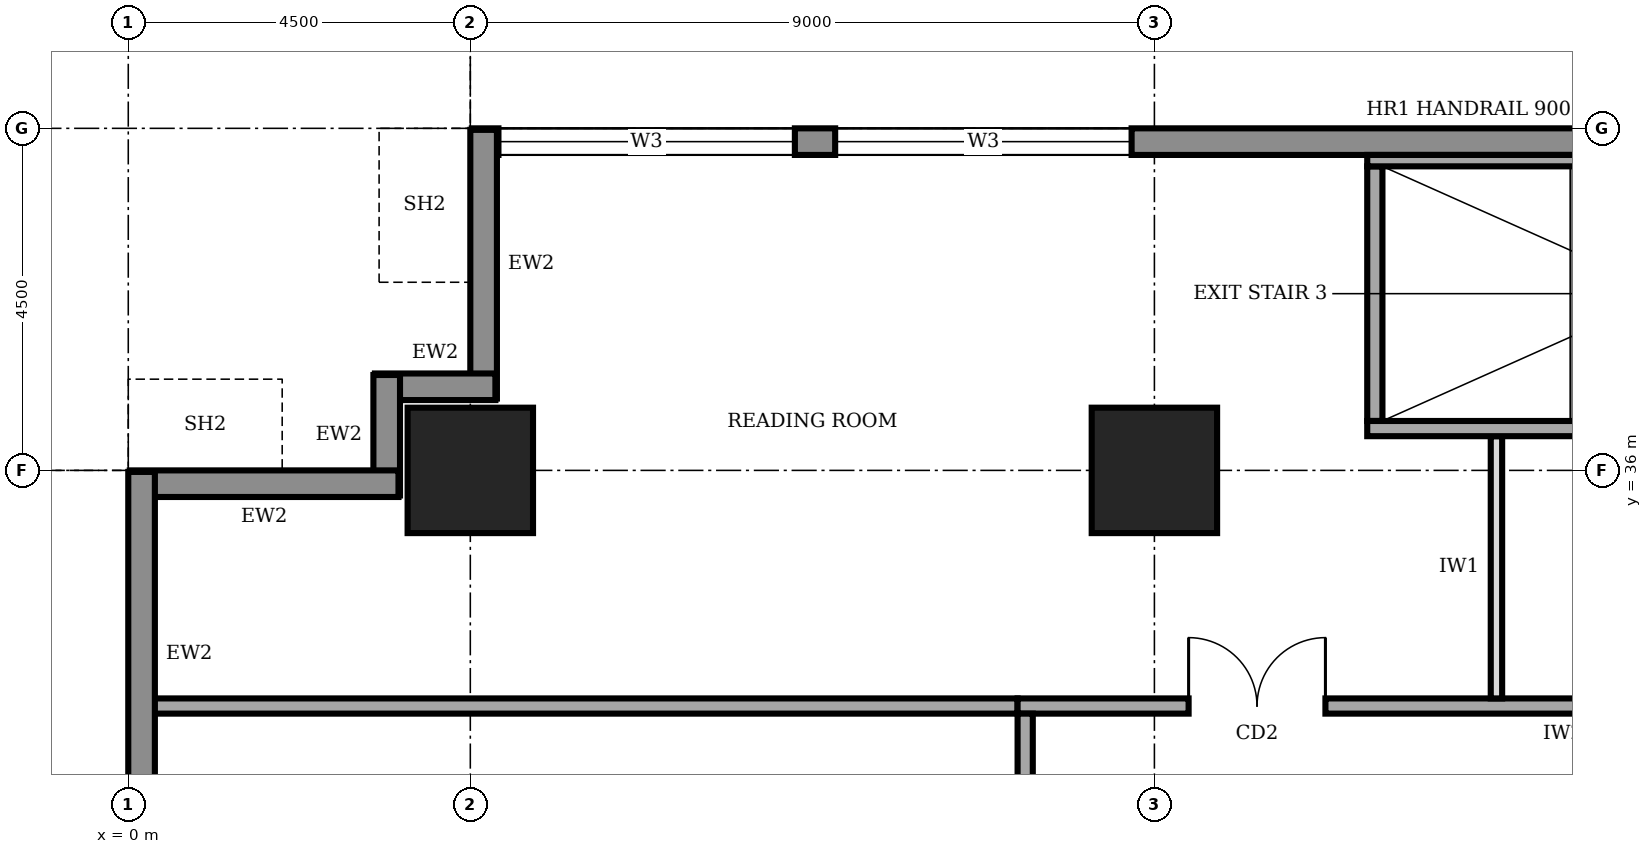
"""IFC4 building model, lengths in metres.
Left out: names, types, materials, properties, quantities, classifications, styles, units other than length and angle.
Written with IfcOpenShell. Run it as: python <this file> out.ifc"""

import sys

from ifc_helpers import new_model, si_unit, direction, frame, frame_2d, origin, origin_2d, place, context, subcontext, project, spatial, rectangle, extrude, element, fill, save


model = new_model("IFC4")
c1 = context("Model", 3, precision=1e-05, world=origin(), true_north=direction((0.0, 1.0)))
c2 = subcontext(c1, "Body", "Model", "MODEL_VIEW")
j1 = project(units=[si_unit("LENGTHUNIT", "METRE"), si_unit("PLANEANGLEUNIT", "RADIAN")], contexts=[c1])
p1 = place(None, origin())
s1 = spatial("IfcSite", under=j1, at=p1, CompositionType="ELEMENT")
p2 = place(p1, origin())
s2 = spatial("IfcBuilding", under=s1, at=p2, CompositionType="ELEMENT")
p3 = place(p2, frame((0.0, 0.0, 201.0)))
s3 = spatial("IfcBuildingStorey", under=s2, at=p3, CompositionType="ELEMENT", Elevation=201.0)
for number, where, z_axis, x_axis in (
    (1, (4.5, 36.0, 0.0), (0.0, 0.0, 1.0), (1.0, 0.0, 0.0)),
    (2, (13.5, 36.0, 0.0), (0.0, 0.0, 1.0), (1.0, 0.0, 0.0)),
):
    element("IfcColumn", number, at=place(p3, frame(where, z_axis=z_axis, x_axis=x_axis)), inside=s3, PredefinedType="COLUMN", context=c2, shape_type="SweptSolid", body=[
        extrude(rectangle(XDim=1.65, YDim=1.65, at=origin_2d()), origin(), (0.0, 0.0, 1.0), 4.0),
    ])
p4 = place(p3, frame((35.98, 40.325, 0.0), z_axis=(0.0, 0.0, 1.0), x_axis=(-1.0, 0.0, 0.0)))
e3 = element("IfcWall", 3, at=p4, inside=s3, PredefinedType="STANDARD", context=c2, shape_type="SweptSolid", body=[
    extrude(rectangle(XDim=31.46, YDim=0.35, at=frame_2d((15.73, 0.0))), origin(), (0.0, 0.0, 1.0), 3.75),
])
p5 = place(p4, frame((27.21, 0.0, 0.95)))
e4 = element("IfcOpeningElement", 4, at=p5, cuts=e3, PredefinedType="OPENING", context=c2, shape_type="SweptSolid", body=[
    extrude(rectangle(XDim=3.9, YDim=1.8, at=frame_2d((1.95, 0.9))), frame((0.0, 0.185, 0.0), z_axis=(0.0, -1.0, 0.0), x_axis=(1.0, 0.0, 0.0)), (0.0, 0.0, 1.0), 0.37),
])
p6 = place(p4, frame((22.78, 0.0, 0.95)))
e5 = element("IfcOpeningElement", 5, at=p6, cuts=e3, PredefinedType="OPENING", context=c2, shape_type="SweptSolid", body=[
    extrude(rectangle(XDim=3.9, YDim=1.8, at=frame_2d((1.95, 0.9))), frame((0.0, 0.185, 0.0), z_axis=(0.0, -1.0, 0.0), x_axis=(1.0, 0.0, 0.0)), (0.0, 0.0, 1.0), 0.37),
])
p7 = place(p4, frame((4.78, 0.0, 0.95)))
e6 = element("IfcOpeningElement", 6, at=p7, cuts=e3, PredefinedType="OPENING", context=c2, shape_type="SweptSolid", body=[
    extrude(rectangle(XDim=3.9, YDim=1.8, at=frame_2d((1.95, 0.9))), frame((0.0, 0.185, 0.0), z_axis=(0.0, -1.0, 0.0), x_axis=(1.0, 0.0, 0.0)), (0.0, 0.0, 1.0), 0.37),
])
p8 = place(p3, frame((4.675, 40.48, 0.0), z_axis=(0.0, 0.0, 1.0), x_axis=(0.0, -1.0, 0.0)))
e7 = element("IfcWall", 7, at=p8, inside=s3, PredefinedType="STANDARD", context=c2, shape_type="SweptSolid", body=[
    extrude(rectangle(XDim=3.535, YDim=0.35, at=frame_2d((1.768, 0.0))), origin(), (0.0, 0.0, 1.0), 2.85),
])
for number, where, z_axis, x_axis in (
    (8, (4.83, 37.1, 0.0), (0.0, 0.0, 1.0), (-1.0, 0.0, 0.0)),
    (9, (3.4, 37.255, 0.0), (0.0, 0.0, 1.0), (0.0, -1.0, 0.0)),
):
    element("IfcWall", number, at=place(p3, frame(where, z_axis=z_axis, x_axis=x_axis)), inside=s3, PredefinedType="STANDARD", context=c2, shape_type="SweptSolid", body=[
        extrude(rectangle(XDim=1.585, YDim=0.35, at=frame_2d((0.792, 0.0))), origin(), (0.0, 0.0, 1.0), 3.75),
    ])
p9 = place(p3, frame((3.555, 35.825, 0.0), z_axis=(0.0, 0.0, 1.0), x_axis=(-1.0, 0.0, 0.0)))
e10 = element("IfcWall", 10, at=p9, inside=s3, PredefinedType="STANDARD", context=c2, shape_type="SweptSolid", body=[
    extrude(rectangle(XDim=3.535, YDim=0.35, at=frame_2d((1.768, 0.0))), origin(), (0.0, 0.0, 1.0), 2.85),
])
p10 = place(p3, frame((0.175, 35.98, 0.0), z_axis=(0.0, 0.0, 1.0), x_axis=(0.0, -1.0, 0.0)))
e11 = element("IfcWall", 11, at=p10, inside=s3, PredefinedType="STANDARD", context=c2, shape_type="SweptSolid", body=[
    extrude(rectangle(XDim=31.46, YDim=0.35, at=frame_2d((15.73, 0.0))), origin(), (0.0, 0.0, 1.0), 3.75),
])
p11 = place(p10, frame((27.21, 0.0, 0.95)))
e12 = element("IfcOpeningElement", 12, at=p11, cuts=e11, PredefinedType="OPENING", context=c2, shape_type="SweptSolid", body=[
    extrude(rectangle(XDim=3.9, YDim=1.8, at=frame_2d((1.95, 0.9))), frame((0.0, 0.185, 0.0), z_axis=(0.0, -1.0, 0.0), x_axis=(1.0, 0.0, 0.0)), (0.0, 0.0, 1.0), 0.37),
])
p12 = place(p10, frame((22.78, 0.0, 0.95)))
e13 = element("IfcOpeningElement", 13, at=p12, cuts=e11, PredefinedType="OPENING", context=c2, shape_type="SweptSolid", body=[
    extrude(rectangle(XDim=3.9, YDim=1.8, at=frame_2d((1.95, 0.9))), frame((0.0, 0.185, 0.0), z_axis=(0.0, -1.0, 0.0), x_axis=(1.0, 0.0, 0.0)), (0.0, 0.0, 1.0), 0.37),
])
p13 = place(p10, frame((18.28, 0.0, 0.95)))
e14 = element("IfcOpeningElement", 14, at=p13, cuts=e11, PredefinedType="OPENING", context=c2, shape_type="SweptSolid", body=[
    extrude(rectangle(XDim=3.9, YDim=1.8, at=frame_2d((1.95, 0.9))), frame((0.0, 0.185, 0.0), z_axis=(0.0, -1.0, 0.0), x_axis=(1.0, 0.0, 0.0)), (0.0, 0.0, 1.0), 0.37),
])
p14 = place(p10, frame((13.78, 0.0, 0.95)))
e15 = element("IfcOpeningElement", 15, at=p14, cuts=e11, PredefinedType="OPENING", context=c2, shape_type="SweptSolid", body=[
    extrude(rectangle(XDim=3.9, YDim=1.8, at=frame_2d((1.95, 0.9))), frame((0.0, 0.185, 0.0), z_axis=(0.0, -1.0, 0.0), x_axis=(1.0, 0.0, 0.0)), (0.0, 0.0, 1.0), 0.37),
])
p15 = place(p10, frame((9.28, 0.0, 0.95)))
e16 = element("IfcOpeningElement", 16, at=p15, cuts=e11, PredefinedType="OPENING", context=c2, shape_type="SweptSolid", body=[
    extrude(rectangle(XDim=3.9, YDim=1.8, at=frame_2d((1.95, 0.9))), frame((0.0, 0.185, 0.0), z_axis=(0.0, -1.0, 0.0), x_axis=(1.0, 0.0, 0.0)), (0.0, 0.0, 1.0), 0.37),
])
p16 = place(p10, frame((4.78, 0.0, 0.95)))
e17 = element("IfcOpeningElement", 17, at=p16, cuts=e11, PredefinedType="OPENING", context=c2, shape_type="SweptSolid", body=[
    extrude(rectangle(XDim=3.9, YDim=1.8, at=frame_2d((1.95, 0.9))), frame((0.0, 0.185, 0.0), z_axis=(0.0, -1.0, 0.0), x_axis=(1.0, 0.0, 0.0)), (0.0, 0.0, 1.0), 0.37),
])
p17 = place(p3, frame((28.6, 32.9, 0.0), z_axis=(0.0, 0.0, 1.0), x_axis=(-1.0, 0.0, 0.0)))
e18 = element("IfcWall", 18, at=p17, inside=s3, PredefinedType="SOLIDWALL", context=c2, shape_type="SweptSolid", body=[
    extrude(rectangle(XDim=16.9, YDim=0.2, at=frame_2d((8.45, 0.0))), origin(), (0.0, 0.0, 1.0), 3.75),
])
p18 = place(p17, frame((12.85, 0.0, 0.0)))
e19 = element("IfcOpeningElement", 19, at=p18, cuts=e18, PredefinedType="OPENING", context=c2, shape_type="SweptSolid", body=[
    extrude(rectangle(XDim=1.8, YDim=2.1, at=frame_2d((0.9, 1.05))), frame((0.0, 0.11, 0.0), z_axis=(0.0, -1.0, 0.0), x_axis=(1.0, 0.0, 0.0)), (0.0, 0.0, 1.0), 0.22),
])
p19 = place(p17, frame((5.6, 0.0, 0.0)))
e20 = element("IfcOpeningElement", 20, at=p19, cuts=e18, PredefinedType="OPENING", context=c2, shape_type="SweptSolid", body=[
    extrude(rectangle(XDim=1.0, YDim=2.1, at=frame_2d((0.5, 1.05))), frame((0.0, 0.11, 0.0), z_axis=(0.0, -1.0, 0.0), x_axis=(1.0, 0.0, 0.0)), (0.0, 0.0, 1.0), 0.22),
])
p20 = place(p17, frame((0.275, 0.0, 0.0)))
e21 = element("IfcOpeningElement", 21, at=p20, cuts=e18, PredefinedType="OPENING", context=c2, shape_type="SweptSolid", body=[
    extrude(rectangle(XDim=1.0, YDim=2.1, at=frame_2d((0.5, 1.05))), frame((0.0, 0.11, 0.0), z_axis=(0.0, -1.0, 0.0), x_axis=(1.0, 0.0, 0.0)), (0.0, 0.0, 1.0), 0.22),
])
p21 = place(p3, frame((11.8, 32.8, 0.0), z_axis=(0.0, 0.0, 1.0), x_axis=(0.0, -1.0, 0.0)))
e22 = element("IfcWall", 22, at=p21, inside=s3, PredefinedType="SOLIDWALL", context=c2, shape_type="SweptSolid", body=[
    extrude(rectangle(XDim=23.8, YDim=0.2, at=frame_2d((11.9, 0.0))), origin(), (0.0, 0.0, 1.0), 3.75),
])
p22 = place(p21, frame((21.05, 0.0, 0.0)))
e23 = element("IfcOpeningElement", 23, at=p22, cuts=e22, PredefinedType="OPENING", context=c2, shape_type="SweptSolid", body=[
    extrude(rectangle(XDim=1.0, YDim=2.1, at=frame_2d((0.5, 1.05))), frame((0.0, 0.11, 0.0), z_axis=(0.0, -1.0, 0.0), x_axis=(1.0, 0.0, 0.0)), (0.0, 0.0, 1.0), 0.22),
])
p23 = place(p21, frame((16.95, 0.0, 0.0)))
e24 = element("IfcOpeningElement", 24, at=p23, cuts=e22, PredefinedType="OPENING", context=c2, shape_type="SweptSolid", body=[
    extrude(rectangle(XDim=0.9, YDim=2.1, at=frame_2d((0.45, 1.05))), frame((0.0, 0.11, 0.0), z_axis=(0.0, -1.0, 0.0), x_axis=(1.0, 0.0, 0.0)), (0.0, 0.0, 1.0), 0.22),
])
p24 = place(p21, frame((13.95, 0.0, 0.0)))
e25 = element("IfcOpeningElement", 25, at=p24, cuts=e22, PredefinedType="OPENING", context=c2, shape_type="SweptSolid", body=[
    extrude(rectangle(XDim=0.9, YDim=2.1, at=frame_2d((0.45, 1.05))), frame((0.0, 0.11, 0.0), z_axis=(0.0, -1.0, 0.0), x_axis=(1.0, 0.0, 0.0)), (0.0, 0.0, 1.0), 0.22),
])
p25 = place(p21, frame((9.1, 0.0, 0.0)))
e26 = element("IfcOpeningElement", 26, at=p25, cuts=e22, PredefinedType="OPENING", context=c2, shape_type="SweptSolid", body=[
    extrude(rectangle(XDim=0.9, YDim=2.1, at=frame_2d((0.45, 1.05))), frame((0.0, 0.11, 0.0), z_axis=(0.0, -1.0, 0.0), x_axis=(1.0, 0.0, 0.0)), (0.0, 0.0, 1.0), 0.22),
])
p26 = place(p21, frame((6.3, 0.0, 0.0)))
e27 = element("IfcOpeningElement", 27, at=p26, cuts=e22, PredefinedType="OPENING", context=c2, shape_type="SweptSolid", body=[
    extrude(rectangle(XDim=1.0, YDim=2.1, at=frame_2d((0.5, 1.05))), frame((0.0, 0.11, 0.0), z_axis=(0.0, -1.0, 0.0), x_axis=(1.0, 0.0, 0.0)), (0.0, 0.0, 1.0), 0.22),
])
p27 = place(p21, frame((11.8, 0.0, 0.0)))
e28 = element("IfcOpeningElement", 28, at=p27, cuts=e22, PredefinedType="OPENING", context=c2, shape_type="SweptSolid", body=[
    extrude(rectangle(XDim=1.0, YDim=2.1, at=frame_2d((0.5, 1.05))), frame((0.0, 0.11, 0.0), z_axis=(0.0, -1.0, 0.0), x_axis=(1.0, 0.0, 0.0)), (0.0, 0.0, 1.0), 0.22),
])
p28 = place(p21, frame((2.3, 0.0, 0.0)))
e29 = element("IfcOpeningElement", 29, at=p28, cuts=e22, PredefinedType="OPENING", context=c2, shape_type="SweptSolid", body=[
    extrude(rectangle(XDim=1.0, YDim=2.1, at=frame_2d((0.5, 1.05))), frame((0.0, 0.11, 0.0), z_axis=(0.0, -1.0, 0.0), x_axis=(1.0, 0.0, 0.0)), (0.0, 0.0, 1.0), 0.22),
])
p29 = place(p3, frame((0.3, 32.9, 0.0), z_axis=(0.0, 0.0, 1.0), x_axis=(1.0, 0.0, 0.0)))
e30 = element("IfcWall", 30, at=p29, inside=s3, PredefinedType="SOLIDWALL", context=c2, shape_type="SweptSolid", body=[
    extrude(rectangle(XDim=11.4, YDim=0.2, at=frame_2d((5.7, 0.0))), origin(), (0.0, 0.0, 1.0), 3.75),
])
p30 = place(p3, frame((18.0, 33.0, 0.0), z_axis=(0.0, 0.0, 1.0), x_axis=(0.0, 1.0, 0.0)))
e31 = element("IfcWall", 31, at=p30, inside=s3, PredefinedType="PARTITIONING", context=c2, shape_type="SweptSolid", body=[
    extrude(rectangle(XDim=3.45, YDim=0.15, at=frame_2d((1.725, 0.0))), origin(), (0.0, 0.0, 1.0), 3.75),
])
p31 = place(p3, frame((16.3, 36.55, 0.0), z_axis=(0.0, 0.0, 1.0), x_axis=(1.0, 0.0, 0.0)))
e32 = element("IfcWall", 32, at=p31, inside=s3, PredefinedType="SOLIDWALL", context=c2, shape_type="SweptSolid", body=[
    extrude(rectangle(XDim=7.9, YDim=0.2, at=frame_2d((3.95, 0.0))), origin(), (0.0, 0.0, 1.0), 3.75),
])
p32 = place(p31, frame((6.3, 0.0, 0.0)))
e33 = element("IfcOpeningElement", 33, at=p32, cuts=e32, PredefinedType="OPENING", context=c2, shape_type="SweptSolid", body=[
    extrude(rectangle(XDim=1.0, YDim=2.1, at=frame_2d((0.5, 1.05))), frame((0.0, 0.11, 0.0), z_axis=(0.0, -1.0, 0.0), x_axis=(1.0, 0.0, 0.0)), (0.0, 0.0, 1.0), 0.22),
])
p33 = place(p3, frame((16.3, 40.075, 0.0), z_axis=(0.0, 0.0, 1.0), x_axis=(1.0, 0.0, 0.0)))
e34 = element("IfcWall", 34, at=p33, inside=s3, PredefinedType="SOLIDWALL", context=c2, shape_type="SweptSolid", body=[
    extrude(rectangle(XDim=7.9, YDim=0.15, at=frame_2d((3.95, 0.0))), origin(), (0.0, 0.0, 1.0), 3.75),
])
p34 = place(p3, frame((16.4, 36.65, 0.0), z_axis=(0.0, 0.0, 1.0), x_axis=(0.0, 1.0, 0.0)))
e35 = element("IfcWall", 35, at=p34, inside=s3, PredefinedType="SOLIDWALL", context=c2, shape_type="SweptSolid", body=[
    extrude(rectangle(XDim=3.35, YDim=0.2, at=frame_2d((1.675, 0.0))), origin(), (0.0, 0.0, 1.0), 3.75),
])
p35 = place(p5, origin())
e36 = element("IfcWindow", 36, at=p35, inside=s3, PartitioningType="SINGLE_PANEL", PredefinedType="WINDOW", context=c2, shape_type="SweptSolid", body=[
    extrude(rectangle(XDim=3.9, YDim=1.8, at=frame_2d((1.95, 0.9))), frame((0.0, 0.03, 0.0), z_axis=(0.0, -1.0, 0.0), x_axis=(1.0, 0.0, 0.0)), (0.0, 0.0, 1.0), 0.06),
])
fill(e4, e36)
p36 = place(p6, origin())
e37 = element("IfcWindow", 37, at=p36, inside=s3, PartitioningType="SINGLE_PANEL", PredefinedType="WINDOW", context=c2, shape_type="SweptSolid", body=[
    extrude(rectangle(XDim=3.9, YDim=1.8, at=frame_2d((1.95, 0.9))), frame((0.0, 0.03, 0.0), z_axis=(0.0, -1.0, 0.0), x_axis=(1.0, 0.0, 0.0)), (0.0, 0.0, 1.0), 0.06),
])
fill(e5, e37)
p37 = place(p18, frame((1.8, 0.0, 0.0), z_axis=(0.0, 0.0, 1.0), x_axis=(-1.0, 0.0, 0.0)))
e38 = element("IfcDoor", 38, at=p37, inside=s3, OperationType="DOUBLE_DOOR_SINGLE_SWING", PredefinedType="DOOR", context=c2, shape_type="SweptSolid", body=[
    extrude(rectangle(XDim=1.8, YDim=2.1, at=frame_2d((0.9, 1.05))), frame((0.0, 0.025, 0.0), z_axis=(0.0, -1.0, 0.0), x_axis=(1.0, 0.0, 0.0)), (0.0, 0.0, 1.0), 0.05),
])
fill(e19, e38)
save(model, sys.argv[1])
